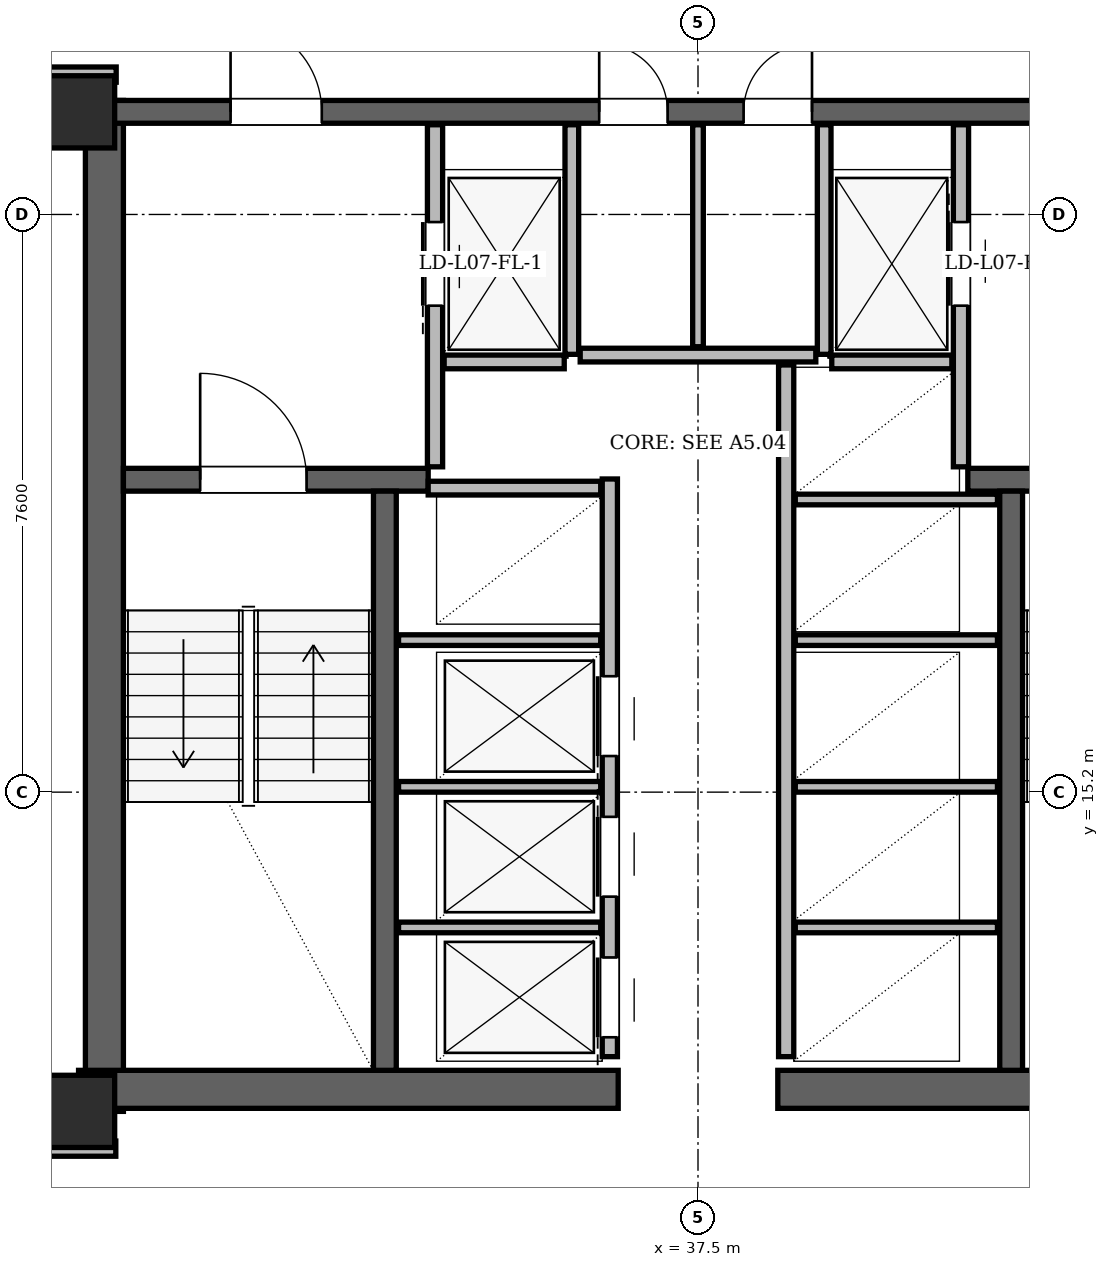
"""IFC4 building model, lengths in metres.
Left out: names, types, materials, properties, quantities, classifications, styles, units other than length and angle.
Written with IfcOpenShell. Run it as: python <this file> out.ifc"""

import sys

from ifc_helpers import new_model, si_unit, direction, frame, frame_2d, origin, origin_2d, place, context, subcontext, project, spatial, rectangle, hollow_rectangle, extrude, element, fill, save


model = new_model("IFC4")
c1 = context("Model", 3, precision=1e-05, world=origin(), true_north=direction((0.0, 1.0)))
c2 = subcontext(c1, "Body", "Model", "MODEL_VIEW")
j1 = project(units=[si_unit("LENGTHUNIT", "METRE"), si_unit("PLANEANGLEUNIT", "RADIAN")], contexts=[c1])
p1 = place(None, origin())
s1 = spatial("IfcSite", under=j1, at=p1, CompositionType="ELEMENT")
p2 = place(p1, origin())
s2 = spatial("IfcBuilding", under=s1, at=p2, CompositionType="ELEMENT")
p3 = place(p2, frame((0.0, 0.0, 30.9)))
s3 = spatial("IfcBuildingStorey", under=s2, at=p3, CompositionType="ELEMENT", Elevation=30.9)
for number, where, z_axis, x_axis in (
    (1, (29.35, 11.0, 0.0), (0.0, 0.0, 1.0), (1.0, 0.0, 0.0)),
    (2, (29.35, 24.15, 0.0), (0.0, 0.0, 1.0), (1.0, 0.0, 0.0)),
):
    element("IfcColumn", number, at=place(p3, frame(where, z_axis=z_axis, x_axis=x_axis)), inside=s3, PredefinedType="COLUMN", context=c2, shape_type="SweptSolid", body=[
        extrude(hollow_rectangle(XDim=0.95, YDim=0.95, WallThickness=0.08, at=origin_2d()), origin(), (0.0, 0.0, 1.0), 3.6),
    ])
p4 = place(p3, frame((29.69, 11.0, 0.0), z_axis=(0.0, 0.0, 1.0), x_axis=(0.0, 1.0, 0.0)))
e3 = element("IfcWall", 3, at=p4, inside=s3, PredefinedType="SHEAR", context=c2, shape_type="SweptSolid", body=[
    extrude(rectangle(XDim=13.3, YDim=0.5, at=frame_2d((6.65, 0.0))), origin(), (0.0, 0.0, 1.0), 3.36),
])
for number, where, z_axis, x_axis in (
    (4, (29.35, 11.29, 0.0), (0.0, 0.0, 1.0), (1.0, 0.0, 0.0)),
    (5, (38.55, 11.29, 0.0), (0.0, 0.0, 1.0), (1.0, 0.0, 0.0)),
):
    element("IfcWall", number, at=place(p3, frame(where, z_axis=z_axis, x_axis=x_axis)), inside=s3, PredefinedType="SHEAR", context=c2, shape_type="SweptSolid", body=[
        extrude(rectangle(XDim=7.1, YDim=0.5, at=frame_2d((3.55, 0.0))), origin(), (0.0, 0.0, 1.0), 3.36),
    ])
p5 = place(p3, frame((29.65, 24.15, 0.0), z_axis=(0.0, 0.0, 1.0), x_axis=(1.0, 0.0, 0.0)))
e6 = element("IfcWall", 6, at=p5, inside=s3, PredefinedType="SHEAR", context=c2, shape_type="SweptSolid", body=[
    extrude(rectangle(XDim=15.7, YDim=0.3, at=frame_2d((7.85, 0.0))), origin(), (0.0, 0.0, 1.0), 3.36),
])
p6 = place(p5, frame((1.7, 0.0, 0.0)))
e7 = element("IfcOpeningElement", 7, at=p6, cuts=e6, PredefinedType="OPENING", context=c2, shape_type="SweptSolid", body=[
    extrude(rectangle(XDim=1.2, YDim=2.2, at=frame_2d((0.6, 1.1))), frame((0.0, 0.15, 0.0), z_axis=(0.0, -1.0, 0.0), x_axis=(1.0, 0.0, 0.0)), (0.0, 0.0, 1.0), 0.3),
])
p7 = place(p5, frame((12.8, 0.0, 0.0)))
e8 = element("IfcOpeningElement", 8, at=p7, cuts=e6, PredefinedType="OPENING", context=c2, shape_type="SweptSolid", body=[
    extrude(rectangle(XDim=1.2, YDim=2.2, at=frame_2d((0.6, 1.1))), frame((0.0, 0.15, 0.0), z_axis=(0.0, -1.0, 0.0), x_axis=(1.0, 0.0, 0.0)), (0.0, 0.0, 1.0), 0.3),
])
p8 = place(p5, frame((6.55, 0.0, 0.0)))
e9 = element("IfcOpeningElement", 9, at=p8, cuts=e6, PredefinedType="OPENING", context=c2, shape_type="SweptSolid", body=[
    extrude(rectangle(XDim=0.9, YDim=2.05, at=frame_2d((0.45, 1.025))), frame((0.0, 0.15, 0.0), z_axis=(0.0, -1.0, 0.0), x_axis=(1.0, 0.0, 0.0)), (0.0, 0.0, 1.0), 0.3),
])
p9 = place(p5, frame((8.45, 0.0, 0.0)))
e10 = element("IfcOpeningElement", 10, at=p9, cuts=e6, PredefinedType="OPENING", context=c2, shape_type="SweptSolid", body=[
    extrude(rectangle(XDim=0.9, YDim=2.05, at=frame_2d((0.45, 1.025))), frame((0.0, 0.15, 0.0), z_axis=(0.0, -1.0, 0.0), x_axis=(1.0, 0.0, 0.0)), (0.0, 0.0, 1.0), 0.3),
])
p10 = place(p3, frame((29.94, 19.31, 0.0), z_axis=(0.0, 0.0, 1.0), x_axis=(1.0, 0.0, 0.0)))
e11 = element("IfcWall", 11, at=p10, inside=s3, PredefinedType="SHEAR", context=c2, shape_type="SweptSolid", body=[
    extrude(rectangle(XDim=4.01, YDim=0.3, at=frame_2d((2.005, 0.0))), origin(), (0.0, 0.0, 1.0), 3.36),
])
p11 = place(p10, frame((1.01, 0.0, 0.0)))
e12 = element("IfcOpeningElement", 12, at=p11, cuts=e11, PredefinedType="OPENING", context=c2, shape_type="SweptSolid", body=[
    extrude(rectangle(XDim=1.4, YDim=2.2, at=frame_2d((0.7, 1.1))), frame((0.0, 0.15, 0.0), z_axis=(0.0, -1.0, 0.0), x_axis=(1.0, 0.0, 0.0)), (0.0, 0.0, 1.0), 0.3),
])
p12 = place(p3, frame((41.05, 19.31, 0.0), z_axis=(0.0, 0.0, 1.0), x_axis=(1.0, 0.0, 0.0)))
e13 = element("IfcWall", 13, at=p12, inside=s3, PredefinedType="SHEAR", context=c2, shape_type="SweptSolid", body=[
    extrude(rectangle(XDim=4.01, YDim=0.3, at=frame_2d((2.005, 0.0))), origin(), (0.0, 0.0, 1.0), 3.36),
])
p13 = place(p12, frame((1.6, 0.0, 0.0)))
e14 = element("IfcOpeningElement", 14, at=p13, cuts=e13, PredefinedType="OPENING", context=c2, shape_type="SweptSolid", body=[
    extrude(rectangle(XDim=1.4, YDim=2.2, at=frame_2d((0.7, 1.1))), frame((0.0, 0.15, 0.0), z_axis=(0.0, -1.0, 0.0), x_axis=(1.0, 0.0, 0.0)), (0.0, 0.0, 1.0), 0.3),
])
for number, where, z_axis, x_axis in (
    (15, (33.38, 11.54, 0.0), (0.0, 0.0, 1.0), (0.0, 1.0, 0.0)),
    (16, (41.62, 11.54, 0.0), (0.0, 0.0, 1.0), (0.0, 1.0, 0.0)),
):
    element("IfcWall", number, at=place(p3, frame(where, z_axis=z_axis, x_axis=x_axis)), inside=s3, PredefinedType="SHEAR", context=c2, shape_type="SweptSolid", body=[
        extrude(rectangle(XDim=7.62, YDim=0.3, at=frame_2d((3.81, 0.0))), origin(), (0.0, 0.0, 1.0), 3.36),
    ])
p14 = place(p3, frame((29.568, 43.631, 0.0), z_axis=(0.0, 0.0, 1.0), x_axis=(-0.500000372107, -0.866025188948, 0.0)))
e17 = element("IfcWall", 17, at=p14, inside=s3, PredefinedType="SOLIDWALL", context=c2, shape_type="SweptSolid", body=[
    extrude(rectangle(XDim=32.825, YDim=0.34, at=frame_2d((16.412, 0.0))), origin(), (0.0, 0.0, 1.0), 2.494),
])
p15 = place(p14, frame((6.159, 0.0, 0.0)))
e18 = element("IfcOpeningElement", 18, at=p15, cuts=e17, PredefinedType="OPENING", context=c2, shape_type="SweptSolid", body=[
    extrude(rectangle(XDim=1.5, YDim=2.2, at=frame_2d((0.75, 1.1))), frame((0.0, 0.17, 0.0), z_axis=(0.0, -1.0, 0.0), x_axis=(1.0, 0.0, 0.0)), (0.0, 0.0, 1.0), 0.34),
])
p16 = place(p14, frame((23.92, 0.0, 0.0)))
e19 = element("IfcOpeningElement", 19, at=p16, cuts=e17, PredefinedType="OPENING", context=c2, shape_type="SweptSolid", body=[
    extrude(rectangle(XDim=1.5, YDim=2.2, at=frame_2d((0.75, 1.1))), frame((0.0, 0.17, 0.0), z_axis=(0.0, -1.0, 0.0), x_axis=(1.0, 0.0, 0.0)), (0.0, 0.0, 1.0), 0.34),
])
p17 = place(p14, frame((29.16, 0.0, 0.85)))
e20 = element("IfcOpeningElement", 20, at=p17, cuts=e17, PredefinedType="OPENING", context=c2, shape_type="SweptSolid", body=[
    extrude(rectangle(XDim=2.4, YDim=1.534, at=frame_2d((1.2, 0.767))), frame((0.0, 0.17, 0.0), z_axis=(0.0, -1.0, 0.0), x_axis=(1.0, 0.0, 0.0)), (0.0, 0.0, 1.0), 0.34),
])
p18 = place(p14, frame((10.76, 0.0, 0.85)))
e21 = element("IfcOpeningElement", 21, at=p18, cuts=e17, PredefinedType="OPENING", context=c2, shape_type="SweptSolid", body=[
    extrude(rectangle(XDim=2.5, YDim=1.534, at=frame_2d((1.25, 0.767))), frame((0.0, 0.17, 0.0), z_axis=(0.0, -1.0, 0.0), x_axis=(1.0, 0.0, 0.0)), (0.0, 0.0, 1.0), 0.34),
])
p19 = place(p14, frame((17.732, 0.0, 0.85)))
e22 = element("IfcOpeningElement", 22, at=p19, cuts=e17, PredefinedType="OPENING", context=c2, shape_type="SweptSolid", body=[
    extrude(rectangle(XDim=2.4, YDim=1.534, at=frame_2d((1.2, 0.767))), frame((0.0, 0.17, 0.0), z_axis=(0.0, -1.0, 0.0), x_axis=(1.0, 0.0, 0.0)), (0.0, 0.0, 1.0), 0.34),
])
p20 = place(p14, frame((1.539, 0.0, 0.85)))
e23 = element("IfcOpeningElement", 23, at=p20, cuts=e17, PredefinedType="OPENING", context=c2, shape_type="SweptSolid", body=[
    extrude(rectangle(XDim=1.2, YDim=1.48, at=frame_2d((0.6, 0.74))), frame((0.0, 0.17, 0.0), z_axis=(0.0, -1.0, 0.0), x_axis=(1.0, 0.0, 0.0)), (0.0, 0.0, 1.0), 0.34),
])
p21 = place(p14, frame((0.69, 0.0, 0.85)))
e24 = element("IfcOpeningElement", 24, at=p21, cuts=e17, PredefinedType="OPENING", context=c2, shape_type="SweptSolid", body=[
    extrude(rectangle(XDim=0.7, YDim=1.2, at=frame_2d((0.35, 0.6))), frame((0.0, 0.17, 0.0), z_axis=(0.0, -1.0, 0.0), x_axis=(1.0, 0.0, 0.0)), (0.0, 0.0, 1.0), 0.34),
])
p22 = place(p3, frame((34.04, 19.48, 0.0), z_axis=(0.0, 0.0, 1.0), x_axis=(0.0, 1.0, 0.0)))
e25 = element("IfcWall", 25, at=p22, inside=s3, PredefinedType="PARTITIONING", context=c2, shape_type="SweptSolid", body=[
    extrude(rectangle(XDim=4.5, YDim=0.2, at=frame_2d((2.25, 0.0))), origin(), (0.0, 0.0, 1.0), 2.4),
])
p23 = place(p22, frame((2.12, 0.0, 0.0)))
e26 = element("IfcOpeningElement", 26, at=p23, cuts=e25, PredefinedType="OPENING", context=c2, shape_type="SweptSolid", body=[
    extrude(rectangle(XDim=1.1, YDim=2.2, at=frame_2d((0.55, 1.1))), frame((0.0, 0.1, 0.0), z_axis=(0.0, -1.0, 0.0), x_axis=(1.0, 0.0, 0.0)), (0.0, 0.0, 1.0), 0.2),
])
p24 = place(p3, frame((35.84, 20.96, 0.0), z_axis=(0.0, 0.0, 1.0), x_axis=(0.0, 1.0, 0.0)))
e27 = element("IfcWall", 27, at=p24, inside=s3, PredefinedType="PARTITIONING", context=c2, shape_type="SweptSolid", body=[
    extrude(rectangle(XDim=3.02, YDim=0.18, at=frame_2d((1.51, 0.0))), origin(), (0.0, 0.0, 1.0), 2.4),
])
p25 = place(p3, frame((34.16, 20.86, 0.0), z_axis=(0.0, 0.0, 1.0), x_axis=(1.0, 0.0, 0.0)))
e28 = element("IfcWall", 28, at=p25, inside=s3, PredefinedType="PARTITIONING", context=c2, shape_type="SweptSolid", body=[
    extrude(rectangle(XDim=1.58, YDim=0.18, at=frame_2d((0.79, 0.0))), origin(), (0.0, 0.0, 1.0), 3.36),
])
p26 = place(p3, frame((40.96, 19.48, 0.0), z_axis=(0.0, 0.0, 1.0), x_axis=(0.0, 1.0, 0.0)))
e29 = element("IfcWall", 29, at=p26, inside=s3, PredefinedType="PARTITIONING", context=c2, shape_type="SweptSolid", body=[
    extrude(rectangle(XDim=4.5, YDim=0.2, at=frame_2d((2.25, 0.0))), origin(), (0.0, 0.0, 1.0), 2.4),
])
p27 = place(p26, frame((2.12, 0.0, 0.0)))
e30 = element("IfcOpeningElement", 30, at=p27, cuts=e29, PredefinedType="OPENING", context=c2, shape_type="SweptSolid", body=[
    extrude(rectangle(XDim=1.1, YDim=2.2, at=frame_2d((0.55, 1.1))), frame((0.0, 0.1, 0.0), z_axis=(0.0, -1.0, 0.0), x_axis=(1.0, 0.0, 0.0)), (0.0, 0.0, 1.0), 0.2),
])
p28 = place(p3, frame((39.16, 20.96, 0.0), z_axis=(0.0, 0.0, 1.0), x_axis=(0.0, 1.0, 0.0)))
e31 = element("IfcWall", 31, at=p28, inside=s3, PredefinedType="PARTITIONING", context=c2, shape_type="SweptSolid", body=[
    extrude(rectangle(XDim=3.02, YDim=0.18, at=frame_2d((1.51, 0.0))), origin(), (0.0, 0.0, 1.0), 2.4),
])
p29 = place(p3, frame((39.26, 20.86, 0.0), z_axis=(0.0, 0.0, 1.0), x_axis=(1.0, 0.0, 0.0)))
e32 = element("IfcWall", 32, at=p29, inside=s3, PredefinedType="PARTITIONING", context=c2, shape_type="SweptSolid", body=[
    extrude(rectangle(XDim=1.58, YDim=0.18, at=frame_2d((0.79, 0.0))), origin(), (0.0, 0.0, 1.0), 3.36),
])
p30 = place(p3, frame((36.34, 11.72, 0.0), z_axis=(0.0, 0.0, 1.0), x_axis=(0.0, 1.0, 0.0)))
e33 = element("IfcWall", 33, at=p30, inside=s3, PredefinedType="PARTITIONING", context=c2, shape_type="SweptSolid", body=[
    extrude(rectangle(XDim=7.6, YDim=0.2, at=frame_2d((3.8, 0.0))), origin(), (0.0, 0.0, 1.0), 3.36),
])
p31 = place(p30, frame((0.255, 0.0, 0.0)))
e34 = element("IfcOpeningElement", 34, at=p31, cuts=e33, PredefinedType="OPENING", context=c2, shape_type="SweptSolid", body=[
    extrude(rectangle(XDim=1.05, YDim=2.15, at=frame_2d((0.525, 1.075))), frame((0.0, 0.1, 0.0), z_axis=(0.0, -1.0, 0.0), x_axis=(1.0, 0.0, 0.0)), (0.0, 0.0, 1.0), 0.2),
])
p32 = place(p30, frame((2.105, 0.0, 0.0)))
e35 = element("IfcOpeningElement", 35, at=p32, cuts=e33, PredefinedType="OPENING", context=c2, shape_type="SweptSolid", body=[
    extrude(rectangle(XDim=1.05, YDim=2.15, at=frame_2d((0.525, 1.075))), frame((0.0, 0.1, 0.0), z_axis=(0.0, -1.0, 0.0), x_axis=(1.0, 0.0, 0.0)), (0.0, 0.0, 1.0), 0.2),
])
p33 = place(p30, frame((3.955, 0.0, 0.0)))
e36 = element("IfcOpeningElement", 36, at=p33, cuts=e33, PredefinedType="OPENING", context=c2, shape_type="SweptSolid", body=[
    extrude(rectangle(XDim=1.05, YDim=2.15, at=frame_2d((0.525, 1.075))), frame((0.0, 0.1, 0.0), z_axis=(0.0, -1.0, 0.0), x_axis=(1.0, 0.0, 0.0)), (0.0, 0.0, 1.0), 0.2),
])
p34 = place(p3, frame((33.95, 19.2, 0.0), z_axis=(0.0, 0.0, 1.0), x_axis=(1.0, 0.0, 0.0)))
e37 = element("IfcWall", 37, at=p34, inside=s3, PredefinedType="PARTITIONING", context=c2, shape_type="SweptSolid", body=[
    extrude(rectangle(XDim=2.27, YDim=0.18, at=frame_2d((1.135, 0.0))), origin(), (0.0, 0.0, 1.0), 3.36),
])
for number, where, z_axis, x_axis in (
    (38, (33.56, 13.42, 0.0), (0.0, 0.0, 1.0), (1.0, 0.0, 0.0)),
    (39, (33.56, 15.27, 0.0), (0.0, 0.0, 1.0), (1.0, 0.0, 0.0)),
    (40, (33.56, 17.2, 0.0), (0.0, 0.0, 1.0), (1.0, 0.0, 0.0)),
):
    element("IfcWall", number, at=place(p3, frame(where, z_axis=z_axis, x_axis=x_axis)), inside=s3, PredefinedType="PARTITIONING", context=c2, shape_type="SweptSolid", body=[
        extrude(rectangle(XDim=2.66, YDim=0.14, at=frame_2d((1.33, 0.0))), origin(), (0.0, 0.0, 1.0), 3.36),
    ])
p35 = place(p3, frame((38.66, 11.72, 0.0), z_axis=(0.0, 0.0, 1.0), x_axis=(0.0, 1.0, 0.0)))
e41 = element("IfcWall", 41, at=p35, inside=s3, PredefinedType="PARTITIONING", context=c2, shape_type="SweptSolid", body=[
    extrude(rectangle(XDim=9.1, YDim=0.2, at=frame_2d((4.55, 0.0))), origin(), (0.0, 0.0, 1.0), 3.36),
])
for number, where, z_axis, x_axis in (
    (42, (38.78, 13.42, 0.0), (0.0, 0.0, 1.0), (1.0, 0.0, 0.0)),
    (43, (38.78, 15.27, 0.0), (0.0, 0.0, 1.0), (1.0, 0.0, 0.0)),
    (44, (38.78, 17.2, 0.0), (0.0, 0.0, 1.0), (1.0, 0.0, 0.0)),
    (45, (38.78, 19.05, 0.0), (0.0, 0.0, 1.0), (1.0, 0.0, 0.0)),
):
    element("IfcWall", number, at=place(p3, frame(where, z_axis=z_axis, x_axis=x_axis)), inside=s3, PredefinedType="PARTITIONING", context=c2, shape_type="SweptSolid", body=[
        extrude(rectangle(XDim=2.66, YDim=0.14, at=frame_2d((1.33, 0.0))), origin(), (0.0, 0.0, 1.0), 3.36),
    ])
p36 = place(p3, frame((35.95, 20.95, 0.0), z_axis=(0.0, 0.0, 1.0), x_axis=(1.0, 0.0, 0.0)))
e46 = element("IfcWall", 46, at=p36, inside=s3, PredefinedType="PARTITIONING", context=c2, shape_type="SweptSolid", body=[
    extrude(rectangle(XDim=3.1, YDim=0.18, at=frame_2d((1.55, 0.0))), origin(), (0.0, 0.0, 1.0), 3.36),
])
p37 = place(p3, frame((37.5, 21.06, 0.0), z_axis=(0.0, 0.0, 1.0), x_axis=(0.0, 1.0, 0.0)))
e47 = element("IfcWall", 47, at=p37, inside=s3, PredefinedType="PARTITIONING", context=c2, shape_type="SweptSolid", body=[
    extrude(rectangle(XDim=2.92, YDim=0.14, at=frame_2d((1.46, 0.0))), origin(), (0.0, 0.0, 1.0), 2.4),
])
p38 = place(p3, frame((28.86, 10.51, 0.0), z_axis=(0.0, 0.0, 1.0), x_axis=(1.0, 0.0, 0.0)))
e48 = element("IfcWall", 48, at=p38, inside=s3, PredefinedType="PARTITIONING", context=c2, shape_type="SweptSolid", body=[
    extrude(rectangle(XDim=0.98, YDim=0.2, at=frame_2d((0.49, 0.0))), origin(), (0.0, 0.0, 1.0), 2.738),
])
p39 = place(p3, frame((28.855, 24.64, 0.0), z_axis=(0.0, 0.0, 1.0), x_axis=(1.0, 0.0, 0.0)))
e49 = element("IfcWall", 49, at=p39, inside=s3, PredefinedType="PARTITIONING", context=c2, shape_type="SweptSolid", body=[
    extrude(rectangle(XDim=0.99, YDim=0.2, at=frame_2d((0.495, 0.0))), origin(), (0.0, 0.0, 1.0), 2.738),
])
p40 = place(p23, origin())
e50 = element("IfcDoor", 50, at=p40, inside=s3, OperationType="SLIDING_TO_LEFT", PredefinedType="DOOR", context=c2, shape_type="SweptSolid", body=[
    extrude(rectangle(XDim=1.1, YDim=2.2, at=frame_2d((0.55, 1.1))), frame((0.0, 0.025, 0.0), z_axis=(0.0, -1.0, 0.0), x_axis=(1.0, 0.0, 0.0)), (0.0, 0.0, 1.0), 0.05),
])
fill(e26, e50)
p41 = place(p27, origin())
e51 = element("IfcDoor", 51, at=p41, inside=s3, OperationType="SLIDING_TO_RIGHT", PredefinedType="DOOR", context=c2, shape_type="SweptSolid", body=[
    extrude(rectangle(XDim=1.1, YDim=2.2, at=frame_2d((0.55, 1.1))), frame((0.0, 0.025, 0.0), z_axis=(0.0, -1.0, 0.0), x_axis=(1.0, 0.0, 0.0)), (0.0, 0.0, 1.0), 0.05),
])
fill(e30, e51)
p42 = place(p31, origin())
e52 = element("IfcDoor", 52, at=p42, inside=s3, OperationType="SLIDING_TO_LEFT", PredefinedType="DOOR", context=c2, shape_type="SweptSolid", body=[
    extrude(rectangle(XDim=1.05, YDim=2.15, at=frame_2d((0.525, 1.075))), frame((0.0, 0.025, 0.0), z_axis=(0.0, -1.0, 0.0), x_axis=(1.0, 0.0, 0.0)), (0.0, 0.0, 1.0), 0.05),
])
fill(e34, e52)
p43 = place(p32, origin())
e53 = element("IfcDoor", 53, at=p43, inside=s3, OperationType="SLIDING_TO_RIGHT", PredefinedType="DOOR", context=c2, shape_type="SweptSolid", body=[
    extrude(rectangle(XDim=1.05, YDim=2.15, at=frame_2d((0.525, 1.075))), frame((0.0, 0.025, 0.0), z_axis=(0.0, -1.0, 0.0), x_axis=(1.0, 0.0, 0.0)), (0.0, 0.0, 1.0), 0.05),
])
fill(e35, e53)
p44 = place(p33, origin())
e54 = element("IfcDoor", 54, at=p44, inside=s3, OperationType="SLIDING_TO_LEFT", PredefinedType="DOOR", context=c2, shape_type="SweptSolid", body=[
    extrude(rectangle(XDim=1.05, YDim=2.15, at=frame_2d((0.525, 1.075))), frame((0.0, 0.025, 0.0), z_axis=(0.0, -1.0, 0.0), x_axis=(1.0, 0.0, 0.0)), (0.0, 0.0, 1.0), 0.05),
])
fill(e36, e54)
p45 = place(p11, origin())
e55 = element("IfcDoor", 55, at=p45, inside=s3, OperationType="SINGLE_SWING_LEFT", PredefinedType="DOOR", context=c2, shape_type="SweptSolid", body=[
    extrude(rectangle(XDim=1.4, YDim=2.2, at=frame_2d((0.7, 1.1))), frame((0.0, 0.025, 0.0), z_axis=(0.0, -1.0, 0.0), x_axis=(1.0, 0.0, 0.0)), (0.0, 0.0, 1.0), 0.05),
])
fill(e12, e55)
p46 = place(p6, origin())
e56 = element("IfcDoor", 56, at=p46, inside=s3, OperationType="SINGLE_SWING_LEFT", PredefinedType="DOOR", context=c2, shape_type="SweptSolid", body=[
    extrude(rectangle(XDim=1.2, YDim=2.2, at=frame_2d((0.6, 1.1))), frame((0.0, 0.025, 0.0), z_axis=(0.0, -1.0, 0.0), x_axis=(1.0, 0.0, 0.0)), (0.0, 0.0, 1.0), 0.05),
])
fill(e7, e56)
p47 = place(p8, origin())
e57 = element("IfcDoor", 57, at=p47, inside=s3, OperationType="SINGLE_SWING_LEFT", PredefinedType="DOOR", context=c2, shape_type="SweptSolid", body=[
    extrude(rectangle(XDim=0.9, YDim=2.05, at=frame_2d((0.45, 1.025))), frame((0.0, 0.025, 0.0), z_axis=(0.0, -1.0, 0.0), x_axis=(1.0, 0.0, 0.0)), (0.0, 0.0, 1.0), 0.05),
])
fill(e9, e57)
p48 = place(p9, origin())
e58 = element("IfcDoor", 58, at=p48, inside=s3, OperationType="SINGLE_SWING_RIGHT", PredefinedType="DOOR", context=c2, shape_type="SweptSolid", body=[
    extrude(rectangle(XDim=0.9, YDim=2.05, at=frame_2d((0.45, 1.025))), frame((0.0, 0.025, 0.0), z_axis=(0.0, -1.0, 0.0), x_axis=(1.0, 0.0, 0.0)), (0.0, 0.0, 1.0), 0.05),
])
fill(e10, e58)
save(model, sys.argv[1])
